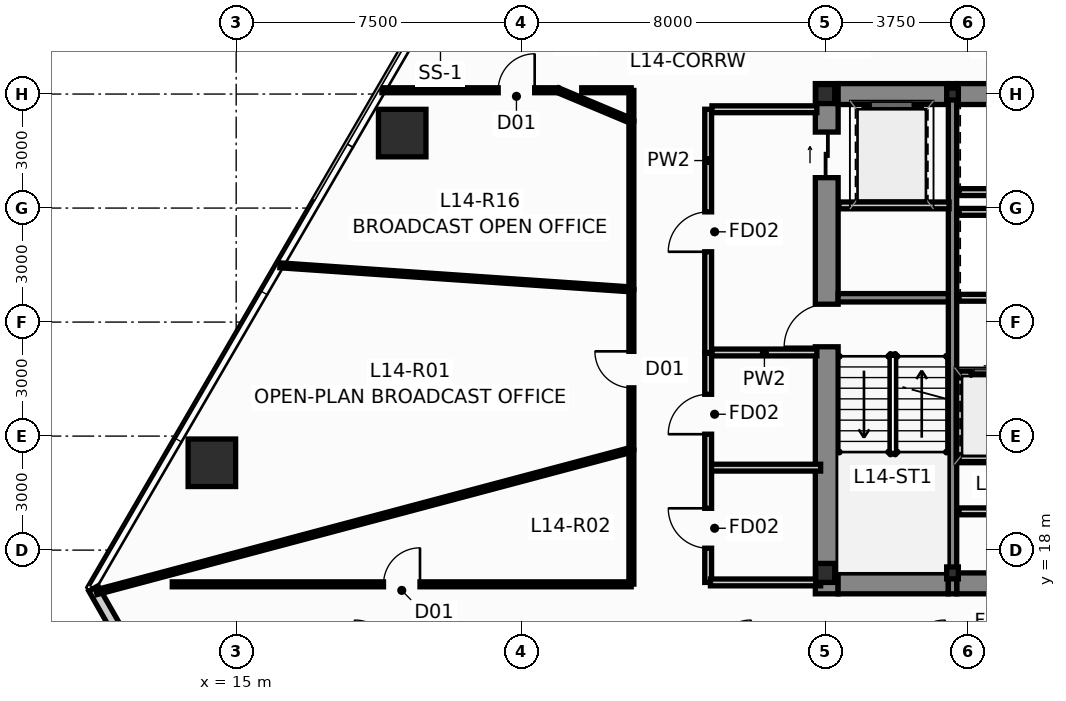
"""IFC4 building model, lengths in metres.
Left out: names, types, materials, properties, quantities, classifications, styles, units other than length and angle.
Written with IfcOpenShell. Run it as: python <this file> out.ifc"""

import sys

from ifc_helpers import new_model, si_unit, direction, frame, frame_2d, origin, origin_2d, place, context, subcontext, project, spatial, rectangle, hollow_rectangle, i_section, extrude, source, transform, mapped, element, fill, save


model = new_model("IFC4")
c1 = context("Model", 3, precision=1e-05, world=origin(), true_north=direction((0.0, 1.0)))
c2 = subcontext(c1, "Body", "Model", "MODEL_VIEW")
j1 = project(units=[si_unit("LENGTHUNIT", "METRE"), si_unit("PLANEANGLEUNIT", "RADIAN")], contexts=[c1])
p1 = place(None, origin())
s1 = spatial("IfcSite", under=j1, at=p1, CompositionType="ELEMENT")
p2 = place(p1, origin())
s2 = spatial("IfcBuilding", under=s1, at=p2, CompositionType="ELEMENT")
p3 = place(p2, frame((0.0, 0.0, 56.8)))
s3 = spatial("IfcBuildingStorey", under=s2, at=p3, CompositionType="ELEMENT", Elevation=56.8)
m1 = source(origin(), c2, "Body", "SweptSolid", [
    extrude(i_section(OverallWidth=0.5, OverallDepth=0.5, WebThickness=0.028, FlangeThickness=0.04, at=origin_2d()), origin(), (0.0, 0.0, 1.0), 3.65),
])
for number, where, z_axis, x_axis in (
    (1, (30.5, 17.4, 0.0), (0.0, 0.0, 1.0), (1.0, 0.0, 0.0)),
    (2, (30.5, 30.0, 0.0), (0.0, 0.0, 1.0), (1.0, 0.0, 0.0)),
):
    element("IfcColumn", number, at=place(p3, frame(where, z_axis=z_axis, x_axis=x_axis)), inside=s3, PredefinedType="COLUMN", context=c2, shape_type="MappedRepresentation", body=[
        mapped(m1, transform((0.0, 0.0, 0.0), scale=1.0)),
    ])
m2 = source(origin(), c2, "Body", "SweptSolid", [
    extrude(i_section(OverallWidth=0.307, OverallDepth=0.315, WebThickness=0.012, FlangeThickness=0.019, at=origin_2d()), origin(), (0.0, 0.0, 1.0), 3.65),
])
for number, where, z_axis, x_axis in (
    (3, (33.85, 17.4, 0.0), (0.0, 0.0, 1.0), (1.0, 0.0, 0.0)),
    (4, (33.85, 30.0, 0.0), (0.0, 0.0, 1.0), (1.0, 0.0, 0.0)),
):
    element("IfcColumn", number, at=place(p3, frame(where, z_axis=z_axis, x_axis=x_axis)), inside=s3, PredefinedType="COLUMN", context=c2, shape_type="MappedRepresentation", body=[
        mapped(m2, transform((0.0, 0.0, 0.0), scale=1.0)),
    ])
p4 = place(p3, frame((30.54, 16.85, 0.0), z_axis=(0.0, 0.0, 1.0), x_axis=(0.0, 1.0, 0.0)))
e5 = element("IfcWall", 5, at=p4, inside=s3, PredefinedType="SHEAR", context=c2, shape_type="SweptSolid", body=[
    extrude(rectangle(XDim=13.425, YDim=0.6, at=frame_2d((6.712, 0.0))), origin(), (0.0, 0.0, 1.0), 3.65),
])
p5 = place(p4, frame((6.5, 0.0, 0.0)))
e6 = element("IfcOpeningElement", 6, at=p5, cuts=e5, PredefinedType="OPENING", context=c2, shape_type="SweptSolid", body=[
    extrude(rectangle(XDim=1.12, YDim=2.15, at=frame_2d((0.56, 1.075))), frame((0.0, 0.312, 0.0), z_axis=(0.0, -1.0, 0.0), x_axis=(1.0, 0.0, 0.0)), (0.0, 0.0, 1.0), 0.624),
])
p6 = place(p4, frame((10.95, 0.0, 0.0)))
e7 = element("IfcOpeningElement", 7, at=p6, cuts=e5, PredefinedType="OPENING", context=c2, shape_type="SweptSolid", body=[
    extrude(rectangle(XDim=1.2, YDim=2.2, at=frame_2d((0.6, 1.1))), frame((0.0, 0.312, 0.0), z_axis=(0.0, -1.0, 0.0), x_axis=(1.0, 0.0, 0.0)), (0.0, 0.0, 1.0), 0.624),
])
p7 = place(p3, frame((30.84, 17.125, 0.0), z_axis=(0.0, 0.0, 1.0), x_axis=(1.0, 0.0, 0.0)))
e8 = element("IfcWall", 8, at=p7, inside=s3, PredefinedType="SHEAR", context=c2, shape_type="SweptSolid", body=[
    extrude(rectangle(XDim=2.9, YDim=0.55, at=frame_2d((1.45, 0.0))), origin(), (0.0, 0.0, 1.0), 3.65),
])
p8 = place(p3, frame((33.96, 17.125, 0.0), z_axis=(0.0, 0.0, 1.0), x_axis=(1.0, 0.0, 0.0)))
e9 = element("IfcWall", 9, at=p8, inside=s3, PredefinedType="SHEAR", context=c2, shape_type="SweptSolid", body=[
    extrude(rectangle(XDim=8.08, YDim=0.55, at=frame_2d((4.04, 0.0))), origin(), (0.0, 0.0, 1.0), 3.65),
])
p9 = place(p3, frame((30.84, 30.0, 0.0), z_axis=(0.0, 0.0, 1.0), x_axis=(1.0, 0.0, 0.0)))
e10 = element("IfcWall", 10, at=p9, inside=s3, PredefinedType="SHEAR", context=c2, shape_type="SweptSolid", body=[
    extrude(rectangle(XDim=2.9, YDim=0.55, at=frame_2d((1.45, 0.0))), origin(), (0.0, 0.0, 1.0), 3.65),
])
p10 = place(p3, frame((33.96, 30.0, 0.0), z_axis=(0.0, 0.0, 1.0), x_axis=(1.0, 0.0, 0.0)))
e11 = element("IfcWall", 11, at=p10, inside=s3, PredefinedType="SHEAR", context=c2, shape_type="SweptSolid", body=[
    extrude(rectangle(XDim=3.78, YDim=0.55, at=frame_2d((1.89, 0.0))), origin(), (0.0, 0.0, 1.0), 3.65),
])
p11 = place(p3, frame((33.85, 16.85, 0.0), z_axis=(0.0, 0.0, 1.0), x_axis=(0.0, 1.0, 0.0)))
e12 = element("IfcWall", 12, at=p11, inside=s3, PredefinedType="SHEAR", context=c2, shape_type="SweptSolid", body=[
    extrude(rectangle(XDim=13.425, YDim=0.22, at=frame_2d((6.712, 0.0))), origin(), (0.0, 0.0, 1.0), 3.65),
])
p12 = place(p3, frame((30.84, 24.64, 0.0), z_axis=(0.0, 0.0, 1.0), x_axis=(1.0, 0.0, 0.0)))
e13 = element("IfcWall", 13, at=p12, inside=s3, PredefinedType="SHEAR", context=c2, shape_type="SweptSolid", body=[
    extrude(rectangle(XDim=2.9, YDim=0.22, at=frame_2d((1.45, 0.0))), origin(), (0.0, 0.0, 1.0), 3.65),
])
m3 = source(origin(), c2, "Body", "SweptSolid", [
    extrude(hollow_rectangle(XDim=1.25, YDim=1.25, WallThickness=0.07, at=origin_2d()), origin(), (0.0, 0.0, 1.0), 3.651),
])
p13 = place(p3, frame((19.369, 28.973, 0.0), z_axis=(0.014913299626, -0.013843287097, 0.999792957015), x_axis=(0.680325028146, 0.732910537568, 0.0)))
e14 = element("IfcColumn", 14, at=p13, inside=s3, PredefinedType="COLUMN", context=c2, shape_type="MappedRepresentation", body=[
    mapped(m3, transform((0.0, 0.0, 0.0), scale=1.0)),
])
m4 = source(origin(), c2, "Body", "SweptSolid", [
    extrude(hollow_rectangle(XDim=1.25, YDim=1.25, WallThickness=0.07, at=origin_2d()), origin(), (0.0, 0.0, 1.0), 3.651),
])
p14 = place(p3, frame((14.36, 20.298, 0.0), z_axis=(0.010431795422, -0.021532295679, 0.999713727968), x_axis=(0.899947055326, 0.435999194506, 0.0)))
e15 = element("IfcColumn", 15, at=p14, inside=s3, PredefinedType="COLUMN", context=c2, shape_type="MappedRepresentation", body=[
    mapped(m4, transform((0.0, 0.0, 0.0), scale=1.0)),
])
p15 = place(p3, frame((18.436, 4.402, 0.0), z_axis=(0.0, 0.0, 1.0), x_axis=(-0.496060958698, 0.868287697284, 0.0)))
e16 = element("IfcWall", 16, at=p15, inside=s3, PredefinedType="STANDARD", context=c2, shape_type="SweptSolid", body=[
    extrude(rectangle(XDim=14.499, YDim=0.28, at=frame_2d((7.249, 0.0))), origin(), (0.0, 0.0, 1.0), 3.4),
])
p16 = place(p15, frame((6.35, 0.0, 0.9)))
e17 = element("IfcOpeningElement", 17, at=p16, cuts=e16, PredefinedType="OPENING", context=c2, shape_type="SweptSolid", body=[
    extrude(rectangle(XDim=1.8, YDim=1.8, at=frame_2d((0.9, 0.9))), frame((0.0, 0.152, 0.0), z_axis=(0.0, -1.0, 0.0), x_axis=(1.0, 0.0, 0.0)), (0.0, 0.0, 1.0), 0.304),
])
p17 = place(p3, frame((34.02, 22.62, 0.0), z_axis=(0.0, 0.0, 1.0), x_axis=(1.0, 0.0, 0.0)))
e18 = element("IfcWall", 18, at=p17, inside=s3, PredefinedType="PARTITIONING", context=c2, shape_type="SweptSolid", body=[
    extrude(rectangle(XDim=3.6, YDim=0.18, at=frame_2d((1.8, 0.0))), origin(), (0.0, 0.0, 1.0), 3.4),
])
p18 = place(p17, frame((0.32, 0.0, 0.0)))
e19 = element("IfcOpeningElement", 19, at=p18, cuts=e18, PredefinedType="OPENING", context=c2, shape_type="SweptSolid", body=[
    extrude(rectangle(XDim=1.1, YDim=2.2, at=frame_2d((0.55, 1.1))), frame((0.0, 0.102, 0.0), z_axis=(0.0, -1.0, 0.0), x_axis=(1.0, 0.0, 0.0)), (0.0, 0.0, 1.0), 0.204),
])
p19 = place(p17, frame((2.12, 0.0, 0.0)))
e20 = element("IfcOpeningElement", 20, at=p19, cuts=e18, PredefinedType="OPENING", context=c2, shape_type="SweptSolid", body=[
    extrude(rectangle(XDim=1.1, YDim=2.2, at=frame_2d((0.55, 1.1))), frame((0.0, 0.102, 0.0), z_axis=(0.0, -1.0, 0.0), x_axis=(1.0, 0.0, 0.0)), (0.0, 0.0, 1.0), 0.204),
])
p20 = place(p3, frame((34.02, 26.9, 0.0), z_axis=(0.0, 0.0, 1.0), x_axis=(1.0, 0.0, 0.0)))
e21 = element("IfcWall", 21, at=p20, inside=s3, PredefinedType="PARTITIONING", context=c2, shape_type="SweptSolid", body=[
    extrude(rectangle(XDim=3.6, YDim=0.18, at=frame_2d((1.8, 0.0))), origin(), (0.0, 0.0, 1.0), 3.4),
])
p21 = place(p3, frame((34.02, 24.64, 0.0), z_axis=(0.0, 0.0, 1.0), x_axis=(1.0, 0.0, 0.0)))
e22 = element("IfcWall", 22, at=p21, inside=s3, PredefinedType="PARTITIONING", context=c2, shape_type="SweptSolid", body=[
    extrude(rectangle(XDim=3.68, YDim=0.18, at=frame_2d((1.84, 0.0))), origin(), (0.0, 0.0, 1.0), 3.4),
])
p22 = place(p3, frame((34.02, 27.42, 0.0), z_axis=(0.0, 0.0, 1.0), x_axis=(1.0, 0.0, 0.0)))
e23 = element("IfcWall", 23, at=p22, inside=s3, PredefinedType="PARTITIONING", context=c2, shape_type="SweptSolid", body=[
    extrude(rectangle(XDim=3.66, YDim=0.18, at=frame_2d((1.83, 0.0))), origin(), (0.0, 0.0, 1.0), 3.4),
])
p23 = place(p3, frame((27.42, 23.2, 0.0), z_axis=(0.0, 0.0, 1.0), x_axis=(0.0, 1.0, 0.0)))
e24 = element("IfcWall", 24, at=p23, inside=s3, PredefinedType="PARTITIONING", context=c2, shape_type="SweptSolid", body=[
    extrude(rectangle(XDim=6.4, YDim=0.18, at=frame_2d((3.2, 0.0))), origin(), (0.0, 0.0, 1.0), 3.4),
])
p24 = place(p23, frame((2.65, 0.0, 0.0)))
e25 = element("IfcOpeningElement", 25, at=p24, cuts=e24, PredefinedType="OPENING", context=c2, shape_type="SweptSolid", body=[
    extrude(rectangle(XDim=1.05, YDim=2.15, at=frame_2d((0.525, 1.075))), frame((0.0, 0.102, 0.0), z_axis=(0.0, -1.0, 0.0), x_axis=(1.0, 0.0, 0.0)), (0.0, 0.0, 1.0), 0.204),
])
p25 = place(p3, frame((27.52, 23.2, 0.0), z_axis=(0.0, 0.0, 1.0), x_axis=(1.0, 0.0, 0.0)))
e26 = element("IfcWall", 26, at=p25, inside=s3, PredefinedType="PARTITIONING", context=c2, shape_type="SweptSolid", body=[
    extrude(rectangle(XDim=2.76, YDim=0.18, at=frame_2d((1.38, 0.0))), origin(), (0.0, 0.0, 1.0), 3.4),
])
p26 = place(p3, frame((27.52, 29.6, 0.0), z_axis=(0.0, 0.0, 1.0), x_axis=(1.0, 0.0, 0.0)))
e27 = element("IfcWall", 27, at=p26, inside=s3, PredefinedType="PARTITIONING", context=c2, shape_type="SweptSolid", body=[
    extrude(rectangle(XDim=2.76, YDim=0.18, at=frame_2d((1.38, 0.0))), origin(), (0.0, 0.0, 1.0), 2.783),
])
p27 = place(p3, frame((30.86, 27.07, 0.0), z_axis=(0.0, 0.0, 1.0), x_axis=(1.0, 0.0, 0.0)))
e28 = element("IfcWall", 28, at=p27, inside=s3, PredefinedType="PARTITIONING", context=c2, shape_type="SweptSolid", body=[
    extrude(rectangle(XDim=2.9, YDim=0.18, at=frame_2d((1.45, 0.0))), origin(), (0.0, 0.0, 1.0), 3.4),
])
p28 = place(p3, frame((34.02, 20.42, 0.0), z_axis=(0.0, 0.0, 1.0), x_axis=(1.0, 0.0, 0.0)))
e29 = element("IfcWall", 29, at=p28, inside=s3, PredefinedType="PARTITIONING", context=c2, shape_type="SweptSolid", body=[
    extrude(rectangle(XDim=3.64, YDim=0.18, at=frame_2d((1.82, 0.0))), origin(), (0.0, 0.0, 1.0), 3.4),
])
p29 = place(p3, frame((34.02, 19.02, 0.0), z_axis=(0.0, 0.0, 1.0), x_axis=(1.0, 0.0, 0.0)))
e30 = element("IfcWall", 30, at=p29, inside=s3, PredefinedType="PARTITIONING", context=c2, shape_type="SweptSolid", body=[
    extrude(rectangle(XDim=3.58, YDim=0.18, at=frame_2d((1.79, 0.0))), origin(), (0.0, 0.0, 1.0), 3.4),
])
p30 = place(p3, frame((27.48, 20.17, 0.0), z_axis=(0.0, 0.0, 1.0), x_axis=(1.0, 0.0, 0.0)))
e31 = element("IfcWall", 31, at=p30, inside=s3, PredefinedType="PARTITIONING", context=c2, shape_type="SweptSolid", body=[
    extrude(rectangle(XDim=2.9, YDim=0.18, at=frame_2d((1.45, 0.0))), origin(), (0.0, 0.0, 1.0), 3.4),
])
p31 = place(p3, frame((27.42, 17.15, 0.0), z_axis=(0.0, 0.0, 1.0), x_axis=(0.0, 1.0, 0.0)))
e32 = element("IfcWall", 32, at=p31, inside=s3, PredefinedType="PARTITIONING", context=c2, shape_type="SweptSolid", body=[
    extrude(rectangle(XDim=6.03, YDim=0.18, at=frame_2d((3.015, 0.0))), origin(), (0.0, 0.0, 1.0), 3.026),
])
p32 = place(p31, frame((0.9, 0.0, 0.0)))
e33 = element("IfcOpeningElement", 33, at=p32, cuts=e32, PredefinedType="OPENING", context=c2, shape_type="SweptSolid", body=[
    extrude(rectangle(XDim=1.05, YDim=2.15, at=frame_2d((0.525, 1.075))), frame((0.0, 0.102, 0.0), z_axis=(0.0, -1.0, 0.0), x_axis=(1.0, 0.0, 0.0)), (0.0, 0.0, 1.0), 0.204),
])
p33 = place(p31, frame((3.9, 0.0, 0.0)))
e34 = element("IfcOpeningElement", 34, at=p33, cuts=e32, PredefinedType="OPENING", context=c2, shape_type="SweptSolid", body=[
    extrude(rectangle(XDim=1.05, YDim=2.15, at=frame_2d((0.525, 1.075))), frame((0.0, 0.102, 0.0), z_axis=(0.0, -1.0, 0.0), x_axis=(1.0, 0.0, 0.0)), (0.0, 0.0, 1.0), 0.204),
])
p34 = place(p3, frame((27.48, 17.15, 0.0), z_axis=(0.0, 0.0, 1.0), x_axis=(1.0, 0.0, 0.0)))
e35 = element("IfcWall", 35, at=p34, inside=s3, PredefinedType="PARTITIONING", context=c2, shape_type="SweptSolid", body=[
    extrude(rectangle(XDim=2.9, YDim=0.18, at=frame_2d((1.45, 0.0))), origin(), (0.0, 0.0, 1.0), 2.783),
])
p35 = place(p3, frame((11.323, 16.893, 0.0), z_axis=(0.0, 0.0, 1.0), x_axis=(0.966343095492, 0.257256723518, 0.0)))
e36 = element("IfcWall", 36, at=p35, inside=s3, PredefinedType="PARTITIONING", context=c2, shape_type="SweptSolid", body=[
    extrude(rectangle(XDim=14.563, YDim=0.13, at=frame_2d((7.281, 0.0))), origin(), (0.0, 0.0, 1.0), 3.4),
])
p36 = place(p3, frame((13.318, 17.1, 0.0), z_axis=(0.0, 0.0, 1.0), x_axis=(1.0, 0.0, 0.0)))
e37 = element("IfcWall", 37, at=p36, inside=s3, PredefinedType="PARTITIONING", context=c2, shape_type="SweptSolid", body=[
    extrude(rectangle(XDim=12.077, YDim=0.13, at=frame_2d((6.039, 0.0))), origin(), (0.0, 0.0, 1.0), 3.4),
])
p37 = place(p36, frame((5.559, 0.0, 0.0)))
e38 = element("IfcOpeningElement", 38, at=p37, cuts=e37, PredefinedType="OPENING", context=c2, shape_type="SweptSolid", body=[
    extrude(rectangle(XDim=0.96, YDim=2.15, at=frame_2d((0.48, 1.075))), frame((0.0, 0.077, 0.0), z_axis=(0.0, -1.0, 0.0), x_axis=(1.0, 0.0, 0.0)), (0.0, 0.0, 1.0), 0.154),
])
p38 = place(p3, frame((16.154, 25.493, 0.0), z_axis=(0.0, 0.0, 1.0), x_axis=(0.997663402028, -0.068320833238, 0.0)))
e39 = element("IfcWall", 39, at=p38, inside=s3, PredefinedType="PARTITIONING", context=c2, shape_type="SweptSolid", body=[
    extrude(rectangle(XDim=9.262, YDim=0.13, at=frame_2d((4.631, 0.0))), origin(), (0.0, 0.0, 1.0), 3.4),
])
p39 = place(p3, frame((18.835, 30.1, 0.0), z_axis=(0.0, 0.0, 1.0), x_axis=(1.0, 0.0, 0.0)))
e40 = element("IfcWall", 40, at=p39, inside=s3, PredefinedType="PARTITIONING", context=c2, shape_type="SweptSolid", body=[
    extrude(rectangle(XDim=4.63, YDim=0.13, at=frame_2d((2.315, 0.0))), origin(), (0.0, 0.0, 1.0), 3.4),
])
p40 = place(p39, frame((3.06, 0.0, 0.0)))
e41 = element("IfcOpeningElement", 41, at=p40, cuts=e40, PredefinedType="OPENING", context=c2, shape_type="SweptSolid", body=[
    extrude(rectangle(XDim=0.96, YDim=2.15, at=frame_2d((0.48, 1.075))), frame((0.0, 0.077, 0.0), z_axis=(0.0, -1.0, 0.0), x_axis=(1.0, 0.0, 0.0)), (0.0, 0.0, 1.0), 0.154),
])
p41 = place(p3, frame((25.4, 24.865, 0.0), z_axis=(0.0, 0.0, 1.0), x_axis=(0.0, 1.0, 0.0)))
e42 = element("IfcWall", 42, at=p41, inside=s3, PredefinedType="PARTITIONING", context=c2, shape_type="SweptSolid", body=[
    extrude(rectangle(XDim=4.42, YDim=0.13, at=frame_2d((2.21, 0.0))), origin(), (0.0, 0.0, 1.0), 3.026),
])
p42 = place(p3, frame((25.4, 20.645, 0.0), z_axis=(0.0, 0.0, 1.0), x_axis=(0.0, 1.0, 0.0)))
e43 = element("IfcWall", 43, at=p42, inside=s3, PredefinedType="PARTITIONING", context=c2, shape_type="SweptSolid", body=[
    extrude(rectangle(XDim=4.21, YDim=0.13, at=frame_2d((2.105, 0.0))), origin(), (0.0, 0.0, 1.0), 3.026),
])
p43 = place(p42, frame((1.625, 0.0, 0.0)))
e44 = element("IfcOpeningElement", 44, at=p43, cuts=e43, PredefinedType="OPENING", context=c2, shape_type="SweptSolid", body=[
    extrude(rectangle(XDim=0.96, YDim=2.15, at=frame_2d((0.48, 1.075))), frame((0.0, 0.077, 0.0), z_axis=(0.0, -1.0, 0.0), x_axis=(1.0, 0.0, 0.0)), (0.0, 0.0, 1.0), 0.154),
])
p44 = place(p3, frame((25.4, 17.105, 0.0), z_axis=(0.0, 0.0, 1.0), x_axis=(0.0, 1.0, 0.0)))
e45 = element("IfcWall", 45, at=p44, inside=s3, PredefinedType="PARTITIONING", context=c2, shape_type="SweptSolid", body=[
    extrude(rectangle(XDim=3.53, YDim=0.13, at=frame_2d((1.765, 0.0))), origin(), (0.0, 0.0, 1.0), 3.026),
])
p45 = place(p3, frame((23.475, 30.098, 0.0), z_axis=(0.0, 0.0, 1.0), x_axis=(0.922060785378, -0.387045098236, 0.0)))
e46 = element("IfcWall", 46, at=p45, inside=s3, PredefinedType="PARTITIONING", context=c2, shape_type="SweptSolid", body=[
    extrude(rectangle(XDim=2.082, YDim=0.13, at=frame_2d((1.041, 0.0))), origin(), (0.0, 0.0, 1.0), 3.4),
])
p46 = place(p3, frame((25.395, 30.1, 0.0), z_axis=(0.0, 0.0, 1.0), x_axis=(-1.0, 0.0, 0.0)))
e47 = element("IfcWall", 47, at=p46, inside=s3, PredefinedType="PARTITIONING", context=c2, shape_type="SweptSolid", body=[
    extrude(rectangle(XDim=1.302, YDim=0.13, at=frame_2d((0.651, 0.0))), origin(), (0.0, 0.0, 1.0), 3.4),
])
p47 = place(p3, frame((25.4, 29.295, 0.0), z_axis=(0.0, 0.0, 1.0), x_axis=(0.0, 1.0, 0.0)))
e48 = element("IfcWall", 48, at=p47, inside=s3, PredefinedType="PARTITIONING", context=c2, shape_type="SweptSolid", body=[
    extrude(rectangle(XDim=0.8, YDim=0.13, at=frame_2d((0.4, 0.0))), origin(), (0.0, 0.0, 1.0), 3.4),
])
p48 = place(p5, origin())
e49 = element("IfcDoor", 49, at=p48, inside=s3, OperationType="SINGLE_SWING_LEFT", PredefinedType="DOOR", context=c2, shape_type="SweptSolid", body=[
    extrude(rectangle(XDim=1.12, YDim=2.15, at=frame_2d((0.56, 1.075))), frame((0.0, 0.025, 0.0), z_axis=(0.0, -1.0, 0.0), x_axis=(1.0, 0.0, 0.0)), (0.0, 0.0, 1.0), 0.05),
])
fill(e6, e49)
p49 = place(p6, origin())
e50 = element("IfcDoor", 50, at=p49, inside=s3, OperationType="SLIDING_TO_LEFT", PredefinedType="DOOR", context=c2, shape_type="SweptSolid", body=[
    extrude(rectangle(XDim=1.2, YDim=2.2, at=frame_2d((0.6, 1.1))), frame((0.0, 0.025, 0.0), z_axis=(0.0, -1.0, 0.0), x_axis=(1.0, 0.0, 0.0)), (0.0, 0.0, 1.0), 0.05),
])
fill(e7, e50)
p50 = place(p18, origin())
e51 = element("IfcDoor", 51, at=p50, inside=s3, OperationType="SLIDING_TO_LEFT", PredefinedType="DOOR", context=c2, shape_type="SweptSolid", body=[
    extrude(rectangle(XDim=1.1, YDim=2.2, at=frame_2d((0.55, 1.1))), frame((0.0, 0.025, 0.0), z_axis=(0.0, -1.0, 0.0), x_axis=(1.0, 0.0, 0.0)), (0.0, 0.0, 1.0), 0.05),
])
fill(e19, e51)
p51 = place(p24, origin())
e52 = element("IfcDoor", 52, at=p51, inside=s3, OperationType="SINGLE_SWING_LEFT", PredefinedType="DOOR", context=c2, shape_type="SweptSolid", body=[
    extrude(rectangle(XDim=1.05, YDim=2.15, at=frame_2d((0.525, 1.075))), frame((0.0, 0.025, 0.0), z_axis=(0.0, -1.0, 0.0), x_axis=(1.0, 0.0, 0.0)), (0.0, 0.0, 1.0), 0.05),
])
fill(e25, e52)
p52 = place(p32, origin())
e53 = element("IfcDoor", 53, at=p52, inside=s3, OperationType="SINGLE_SWING_RIGHT", PredefinedType="DOOR", context=c2, shape_type="SweptSolid", body=[
    extrude(rectangle(XDim=1.05, YDim=2.15, at=frame_2d((0.525, 1.075))), frame((0.0, 0.025, 0.0), z_axis=(0.0, -1.0, 0.0), x_axis=(1.0, 0.0, 0.0)), (0.0, 0.0, 1.0), 0.05),
])
fill(e33, e53)
p53 = place(p33, origin())
e54 = element("IfcDoor", 54, at=p53, inside=s3, OperationType="SINGLE_SWING_LEFT", PredefinedType="DOOR", context=c2, shape_type="SweptSolid", body=[
    extrude(rectangle(XDim=1.05, YDim=2.15, at=frame_2d((0.525, 1.075))), frame((0.0, 0.025, 0.0), z_axis=(0.0, -1.0, 0.0), x_axis=(1.0, 0.0, 0.0)), (0.0, 0.0, 1.0), 0.05),
])
fill(e34, e54)
p54 = place(p37, origin())
e55 = element("IfcDoor", 55, at=p54, inside=s3, OperationType="SINGLE_SWING_RIGHT", PredefinedType="DOOR", context=c2, shape_type="SweptSolid", body=[
    extrude(rectangle(XDim=0.96, YDim=2.15, at=frame_2d((0.48, 1.075))), frame((0.0, 0.025, 0.0), z_axis=(0.0, -1.0, 0.0), x_axis=(1.0, 0.0, 0.0)), (0.0, 0.0, 1.0), 0.05),
])
fill(e38, e55)
p55 = place(p40, origin())
e56 = element("IfcDoor", 56, at=p55, inside=s3, OperationType="SINGLE_SWING_RIGHT", PredefinedType="DOOR", context=c2, shape_type="SweptSolid", body=[
    extrude(rectangle(XDim=0.96, YDim=2.15, at=frame_2d((0.48, 1.075))), frame((0.0, 0.025, 0.0), z_axis=(0.0, -1.0, 0.0), x_axis=(1.0, 0.0, 0.0)), (0.0, 0.0, 1.0), 0.05),
])
fill(e41, e56)
p56 = place(p43, origin())
e57 = element("IfcDoor", 57, at=p56, inside=s3, OperationType="SINGLE_SWING_RIGHT", PredefinedType="DOOR", context=c2, shape_type="SweptSolid", body=[
    extrude(rectangle(XDim=0.96, YDim=2.15, at=frame_2d((0.48, 1.075))), frame((0.0, 0.025, 0.0), z_axis=(0.0, -1.0, 0.0), x_axis=(1.0, 0.0, 0.0)), (0.0, 0.0, 1.0), 0.05),
])
fill(e44, e57)
save(model, sys.argv[1])
